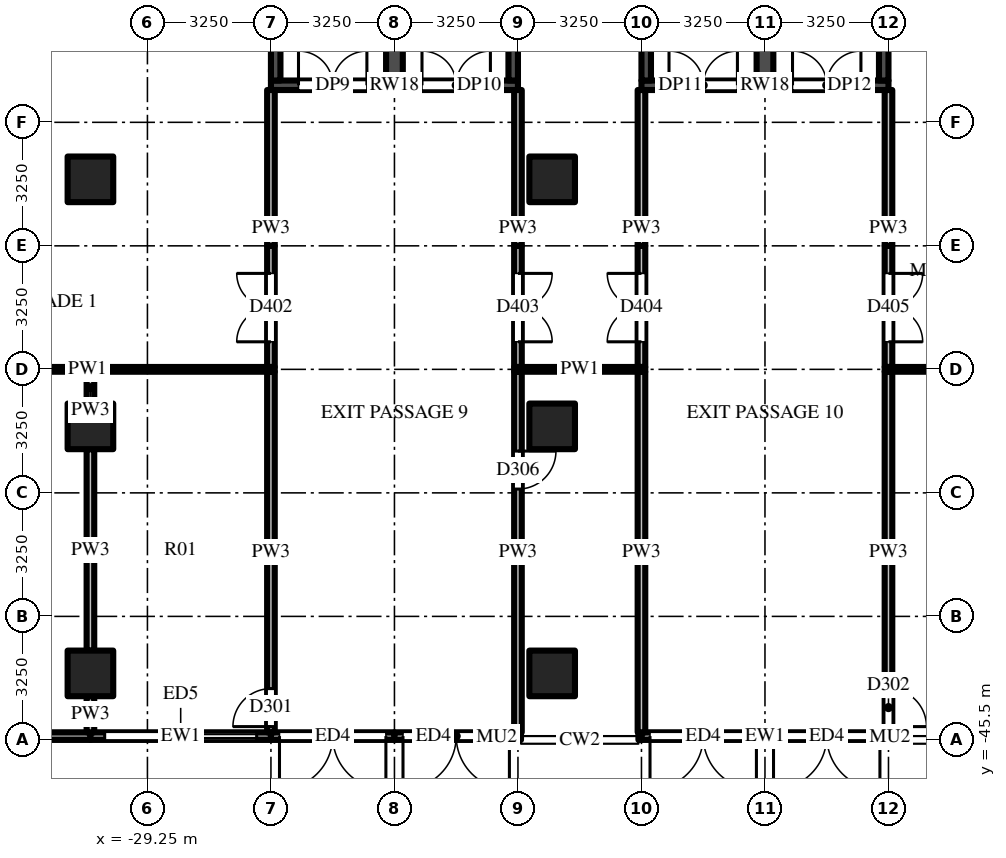
"""IFC4 building model, lengths in metres.
Left out: names, types, materials, properties, quantities, classifications, styles, units other than length and angle.
Written with IfcOpenShell. Run it as: python <this file> out.ifc"""

import sys

from ifc_helpers import new_model, si_unit, direction, frame, frame_2d, origin, origin_2d, place, context, subcontext, project, spatial, rectangle, extrude, source, transform, mapped, element, fill, save


model = new_model("IFC4")
c1 = context("Model", 3, precision=1e-05, world=origin(), true_north=direction((0.0, 1.0)))
c2 = subcontext(c1, "Body", "Model", "MODEL_VIEW")
j1 = project(units=[si_unit("LENGTHUNIT", "METRE"), si_unit("PLANEANGLEUNIT", "RADIAN")], contexts=[c1])
p1 = place(None, origin())
s1 = spatial("IfcSite", under=j1, at=p1, CompositionType="ELEMENT")
p2 = place(p1, origin())
s2 = spatial("IfcBuilding", under=s1, at=p2, CompositionType="ELEMENT")
p3 = place(p2, origin())
s3 = spatial("IfcBuildingStorey", under=s2, at=p3, CompositionType="ELEMENT", Elevation=0.0)
m1 = source(origin(), c2, "Body", "SweptSolid", [
    extrude(rectangle(XDim=1.2, YDim=1.2, at=origin_2d()), origin(), (0.0, 0.0, 1.0), 8.5),
])
for number, where, z_axis, x_axis in (
    (1, (-18.6, -30.75, -0.5), (0.0, 0.0, 1.0), (1.0, 0.0, 0.0)),
    (2, (-18.6, -37.25, -0.5), (0.0, 0.0, 1.0), (1.0, 0.0, 0.0)),
    (3, (-18.6, -43.75, -0.5), (0.0, 0.0, 1.0), (1.0, 0.0, 0.0)),
    (4, (-30.75, -30.75, -0.5), (0.0, 0.0, 1.0), (1.0, 0.0, 0.0)),
    (5, (-30.75, -37.25, -0.5), (0.0, 0.0, 1.0), (1.0, 0.0, 0.0)),
    (6, (-30.75, -43.75, -0.5), (0.0, 0.0, 1.0), (1.0, 0.0, 0.0)),
):
    element("IfcColumn", number, at=place(p3, frame(where, z_axis=z_axis, x_axis=x_axis)), inside=s3, PredefinedType="COLUMN", context=c2, shape_type="MappedRepresentation", body=[
        mapped(m1, transform((0.0, 0.0, 0.0))),
    ])
m2 = source(origin(), c2, "Body", "SweptSolid", [
    extrude(rectangle(XDim=6.5, YDim=0.25, at=frame_2d((3.25, 0.0))), origin(), (0.0, 0.0, 1.0), 7.7),
])
p4 = place(p3, frame((-26.0, -28.275, 0.0), z_axis=(0.0, 0.0, 1.0), x_axis=(1.0, 0.0, 0.0)))
e7 = element("IfcWall", 7, at=p4, inside=s3, PredefinedType="SHEAR", context=c2, shape_type="MappedRepresentation", body=[
    mapped(m2, transform((0.0, 0.0, 0.0))),
])
m3 = source(origin(), c2, "Body", "SweptSolid", [
    extrude(rectangle(XDim=1.8, YDim=2.1, at=frame_2d((0.9, 1.05))), frame((0.0, 0.135, 0.0), z_axis=(0.0, -1.0, 0.0), x_axis=(1.0, 0.0, 0.0)), (0.0, 0.0, 1.0), 0.27),
])
p5 = place(p4, frame((0.725, 0.0, 0.0)))
e8 = element("IfcOpeningElement", 8, at=p5, cuts=e7, PredefinedType="OPENING", context=c2, shape_type="MappedRepresentation", body=[
    mapped(m3, transform((0.0, 0.0, 0.0))),
])
p6 = place(p4, frame((3.975, 0.0, 0.0)))
e9 = element("IfcOpeningElement", 9, at=p6, cuts=e7, PredefinedType="OPENING", context=c2, shape_type="MappedRepresentation", body=[
    mapped(m3, transform((0.0, 0.0, 0.0))),
])
m4 = source(origin(), c2, "Body", "SweptSolid", [
    extrude(rectangle(XDim=8.3, YDim=0.25, at=frame_2d((4.15, 0.0))), origin(), (0.0, 0.0, 1.0), 7.7),
])
for number, where, z_axis, x_axis in (
    (10, (-25.875, -28.15, 0.0), (0.0, 0.0, 1.0), (0.0, 1.0, 0.0)),
    (11, (-19.625, -28.15, 0.0), (0.0, 0.0, 1.0), (0.0, 1.0, 0.0)),
):
    element("IfcWall", number, at=place(p3, frame(where, z_axis=z_axis, x_axis=x_axis)), inside=s3, PredefinedType="SHEAR", context=c2, shape_type="MappedRepresentation", body=[
        mapped(m4, transform((0.0, 0.0, 0.0))),
    ])
m5 = source(origin(), c2, "Body", "SweptSolid", [
    extrude(rectangle(XDim=8.3, YDim=0.44, at=frame_2d((4.15, 0.0))), origin(), (0.0, 0.0, 1.0), 7.7),
])
p7 = place(p3, frame((-22.75, -28.15, 0.0), z_axis=(0.0, 0.0, 1.0), x_axis=(0.0, 1.0, 0.0)))
e12 = element("IfcWall", 12, at=p7, inside=s3, PredefinedType="SHEAR", context=c2, shape_type="MappedRepresentation", body=[
    mapped(m5, transform((0.0, 0.0, 0.0))),
])
p8 = place(p3, frame((-16.25, -28.275, 0.0), z_axis=(0.0, 0.0, 1.0), x_axis=(1.0, 0.0, 0.0)))
e13 = element("IfcWall", 13, at=p8, inside=s3, PredefinedType="SHEAR", context=c2, shape_type="MappedRepresentation", body=[
    mapped(m2, transform((0.0, 0.0, 0.0))),
])
p9 = place(p8, frame((0.725, 0.0, 0.0)))
e14 = element("IfcOpeningElement", 14, at=p9, cuts=e13, PredefinedType="OPENING", context=c2, shape_type="MappedRepresentation", body=[
    mapped(m3, transform((0.0, 0.0, 0.0))),
])
p10 = place(p8, frame((3.975, 0.0, 0.0)))
e15 = element("IfcOpeningElement", 15, at=p10, cuts=e13, PredefinedType="OPENING", context=c2, shape_type="MappedRepresentation", body=[
    mapped(m3, transform((0.0, 0.0, 0.0))),
])
for number, where, z_axis, x_axis in (
    (16, (-16.125, -28.15, 0.0), (0.0, 0.0, 1.0), (0.0, 1.0, 0.0)),
    (17, (-9.875, -28.15, 0.0), (0.0, 0.0, 1.0), (0.0, 1.0, 0.0)),
):
    element("IfcWall", number, at=place(p3, frame(where, z_axis=z_axis, x_axis=x_axis)), inside=s3, PredefinedType="SHEAR", context=c2, shape_type="MappedRepresentation", body=[
        mapped(m4, transform((0.0, 0.0, 0.0))),
    ])
p11 = place(p3, frame((-13.0, -28.15, 0.0), z_axis=(0.0, 0.0, 1.0), x_axis=(0.0, 1.0, 0.0)))
e18 = element("IfcWall", 18, at=p11, inside=s3, PredefinedType="SHEAR", context=c2, shape_type="MappedRepresentation", body=[
    mapped(m5, transform((0.0, 0.0, 0.0))),
])
m6 = source(origin(), c2, "Body", "SweptSolid", [
    extrude(rectangle(XDim=6.5, YDim=0.2, at=frame_2d((3.25, 0.0))), origin(), (0.0, 0.0, 1.0), 7.7),
])
p12 = place(p3, frame((-30.75, -45.4, 0.0), z_axis=(0.0, 0.0, 1.0), x_axis=(-1.0, 0.0, 0.0)))
e19 = element("IfcWall", 19, at=p12, inside=s3, PredefinedType="SOLIDWALL", context=c2, shape_type="MappedRepresentation", body=[
    mapped(m6, transform((0.0, 0.0, 0.0))),
])
m7 = source(origin(), c2, "Body", "SweptSolid", [
    extrude(rectangle(XDim=4.0, YDim=4.5, at=frame_2d((2.0, 2.25))), frame((0.0, 0.11, 0.0), z_axis=(0.0, -1.0, 0.0), x_axis=(1.0, 0.0, 0.0)), (0.0, 0.0, 1.0), 0.22),
])
p13 = place(p12, frame((1.25, 0.0, 0.0)))
e20 = element("IfcOpeningElement", 20, at=p13, cuts=e19, PredefinedType="OPENING", context=c2, shape_type="MappedRepresentation", body=[
    mapped(m7, transform((0.0, 0.0, 0.0))),
])
p14 = place(p3, frame((-26.0, -45.4, 0.0), z_axis=(0.0, 0.0, 1.0), x_axis=(-1.0, 0.0, 0.0)))
e21 = element("IfcWall", 21, at=p14, inside=s3, PredefinedType="SOLIDWALL", context=c2, shape_type="SweptSolid", body=[
    extrude(rectangle(XDim=4.75, YDim=0.2, at=frame_2d((2.375, 0.0))), origin(), (0.0, 0.0, 1.0), 7.7),
])
p15 = place(p14, frame((0.375, 0.0, 0.0)))
e22 = element("IfcOpeningElement", 22, at=p15, cuts=e21, PredefinedType="OPENING", context=c2, shape_type="MappedRepresentation", body=[
    mapped(m7, transform((0.0, 0.0, 0.0))),
])
m8 = source(origin(), c2, "Body", "SweptSolid", [
    extrude(rectangle(XDim=3.25, YDim=0.2, at=frame_2d((1.625, 0.0))), origin(), (0.0, 0.0, 1.0), 7.7),
])
p16 = place(p3, frame((-22.75, -45.4, 0.0), z_axis=(0.0, 0.0, 1.0), x_axis=(-1.0, 0.0, 0.0)))
e23 = element("IfcWall", 23, at=p16, inside=s3, PredefinedType="SOLIDWALL", context=c2, shape_type="MappedRepresentation", body=[
    mapped(m8, transform((0.0, 0.0, 0.0))),
])
m9 = source(origin(), c2, "Body", "SweptSolid", [
    extrude(rectangle(XDim=2.8, YDim=2.4, at=frame_2d((1.4, 1.2))), frame((0.0, 0.11, 0.0), z_axis=(0.0, -1.0, 0.0), x_axis=(1.0, 0.0, 0.0)), (0.0, 0.0, 1.0), 0.22),
])
p17 = place(p16, frame((0.225, 0.0, 0.0)))
e24 = element("IfcOpeningElement", 24, at=p17, cuts=e23, PredefinedType="OPENING", context=c2, shape_type="MappedRepresentation", body=[
    mapped(m9, transform((0.0, 0.0, 0.0))),
])
p18 = place(p3, frame((-19.5, -45.4, 0.0), z_axis=(0.0, 0.0, 1.0), x_axis=(-1.0, 0.0, 0.0)))
e25 = element("IfcWall", 25, at=p18, inside=s3, PredefinedType="SOLIDWALL", context=c2, shape_type="MappedRepresentation", body=[
    mapped(m8, transform((0.0, 0.0, 0.0))),
])
p19 = place(p18, frame((0.225, 0.0, 0.0)))
e26 = element("IfcOpeningElement", 26, at=p19, cuts=e25, PredefinedType="OPENING", context=c2, shape_type="MappedRepresentation", body=[
    mapped(m9, transform((0.0, 0.0, 0.0))),
])
p20 = place(p3, frame((-13.0, -45.4, 0.0), z_axis=(0.0, 0.0, 1.0), x_axis=(-1.0, 0.0, 0.0)))
e27 = element("IfcWall", 27, at=p20, inside=s3, PredefinedType="SOLIDWALL", context=c2, shape_type="MappedRepresentation", body=[
    mapped(m8, transform((0.0, 0.0, 0.0))),
])
p21 = place(p20, frame((0.225, 0.0, 0.0)))
e28 = element("IfcOpeningElement", 28, at=p21, cuts=e27, PredefinedType="OPENING", context=c2, shape_type="MappedRepresentation", body=[
    mapped(m9, transform((0.0, 0.0, 0.0))),
])
p22 = place(p3, frame((-9.75, -45.4, 0.0), z_axis=(0.0, 0.0, 1.0), x_axis=(-1.0, 0.0, 0.0)))
e29 = element("IfcWall", 29, at=p22, inside=s3, PredefinedType="SOLIDWALL", context=c2, shape_type="MappedRepresentation", body=[
    mapped(m8, transform((0.0, 0.0, 0.0))),
])
p23 = place(p22, frame((0.225, 0.0, 0.0)))
e30 = element("IfcOpeningElement", 30, at=p23, cuts=e29, PredefinedType="OPENING", context=c2, shape_type="MappedRepresentation", body=[
    mapped(m9, transform((0.0, 0.0, 0.0))),
])
p24 = place(p3, frame((-30.75, -45.3, 0.0), z_axis=(0.0, 0.0, 1.0), x_axis=(0.0, 1.0, 0.0)))
e31 = element("IfcWall", 31, at=p24, inside=s3, PredefinedType="PARTITIONING", context=c2, shape_type="SweptSolid", body=[
    extrude(rectangle(XDim=0.95, YDim=0.2, at=frame_2d((0.475, 0.0))), origin(), (0.0, 0.0, 1.0), 7.7),
])
p25 = place(p3, frame((-30.75, -43.15, 0.0), z_axis=(0.0, 0.0, 1.0), x_axis=(0.0, 1.0, 0.0)))
e32 = element("IfcWall", 32, at=p25, inside=s3, PredefinedType="PARTITIONING", context=c2, shape_type="SweptSolid", body=[
    extrude(rectangle(XDim=5.3, YDim=0.2, at=frame_2d((2.65, 0.0))), origin(), (0.0, 0.0, 1.0), 6.997),
])
p26 = place(p3, frame((-30.75, -36.65, 0.0), z_axis=(0.0, 0.0, 1.0), x_axis=(0.0, 1.0, 0.0)))
e33 = element("IfcWall", 33, at=p26, inside=s3, PredefinedType="PARTITIONING", context=c2, shape_type="SweptSolid", body=[
    extrude(rectangle(XDim=0.837, YDim=0.2, at=frame_2d((0.419, 0.0))), origin(), (0.0, 0.0, 1.0), 6.997),
])
m10 = source(origin(), c2, "Body", "SweptSolid", [
    extrude(rectangle(XDim=3.188, YDim=0.2, at=frame_2d((1.594, 0.0))), origin(), (0.0, 0.0, 1.0), 6.997),
])
p27 = place(p3, frame((-26.0, -35.688, 0.0), z_axis=(0.0, 0.0, 1.0), x_axis=(0.0, 1.0, 0.0)))
e34 = element("IfcWall", 34, at=p27, inside=s3, PredefinedType="PARTITIONING", context=c2, shape_type="MappedRepresentation", body=[
    mapped(m10, transform((0.0, 0.0, 0.0))),
])
m11 = source(origin(), c2, "Body", "SweptSolid", [
    extrude(rectangle(XDim=1.8, YDim=2.1, at=frame_2d((0.9, 1.05))), frame((0.0, 0.11, 0.0), z_axis=(0.0, -1.0, 0.0), x_axis=(1.0, 0.0, 0.0)), (0.0, 0.0, 1.0), 0.22),
])
p28 = place(p27, frame((0.663, 0.0, 0.0)))
e35 = element("IfcOpeningElement", 35, at=p28, cuts=e34, PredefinedType="OPENING", context=c2, shape_type="MappedRepresentation", body=[
    mapped(m11, transform((0.0, 0.0, 0.0))),
])
m12 = source(origin(), c2, "Body", "SweptSolid", [
    extrude(rectangle(XDim=4.1, YDim=0.2, at=frame_2d((2.05, 0.0))), origin(), (0.0, 0.0, 1.0), 6.839),
])
p29 = place(p3, frame((-26.0, -28.4, 0.0), z_axis=(0.0, 0.0, 1.0), x_axis=(0.0, -1.0, 0.0)))
e36 = element("IfcWall", 36, at=p29, inside=s3, PredefinedType="PARTITIONING", context=c2, shape_type="MappedRepresentation", body=[
    mapped(m12, transform((0.0, 0.0, 0.0))),
])
m13 = source(origin(), c2, "Body", "SweptSolid", [
    extrude(rectangle(XDim=9.488, YDim=0.2, at=frame_2d((4.744, 0.0))), origin(), (0.0, 0.0, 1.0), 6.839),
])
p30 = place(p3, frame((-26.0, -45.3, 0.0), z_axis=(0.0, 0.0, 1.0), x_axis=(0.0, 1.0, 0.0)))
e37 = element("IfcWall", 37, at=p30, inside=s3, PredefinedType="PARTITIONING", context=c2, shape_type="MappedRepresentation", body=[
    mapped(m13, transform((0.0, 0.0, 0.0))),
])
m14 = source(origin(), c2, "Body", "SweptSolid", [
    extrude(rectangle(XDim=1.0, YDim=2.1, at=frame_2d((0.5, 1.05))), frame((0.0, 0.11, 0.0), z_axis=(0.0, -1.0, 0.0), x_axis=(1.0, 0.0, 0.0)), (0.0, 0.0, 1.0), 0.22),
])
p31 = place(p30, frame((0.15, 0.0, 0.0)))
e38 = element("IfcOpeningElement", 38, at=p31, cuts=e37, PredefinedType="OPENING", context=c2, shape_type="MappedRepresentation", body=[
    mapped(m14, transform((0.0, 0.0, 0.0))),
])
p32 = place(p3, frame((-19.5, -32.5, 0.0), z_axis=(0.0, 0.0, 1.0), x_axis=(0.0, -1.0, 0.0)))
e39 = element("IfcWall", 39, at=p32, inside=s3, PredefinedType="PARTITIONING", context=c2, shape_type="MappedRepresentation", body=[
    mapped(m10, transform((0.0, 0.0, 0.0))),
])
p33 = place(p32, frame((0.725, 0.0, 0.0)))
e40 = element("IfcOpeningElement", 40, at=p33, cuts=e39, PredefinedType="OPENING", context=c2, shape_type="MappedRepresentation", body=[
    mapped(m11, transform((0.0, 0.0, 0.0))),
])
p34 = place(p3, frame((-19.5, -35.812, 0.0), z_axis=(0.0, 0.0, 1.0), x_axis=(0.0, -1.0, 0.0)))
e41 = element("IfcWall", 41, at=p34, inside=s3, PredefinedType="PARTITIONING", context=c2, shape_type="MappedRepresentation", body=[
    mapped(m13, transform((0.0, 0.0, 0.0))),
])
p35 = place(p34, frame((2.087, 0.0, 0.0)))
e42 = element("IfcOpeningElement", 42, at=p35, cuts=e41, PredefinedType="OPENING", context=c2, shape_type="MappedRepresentation", body=[
    mapped(m14, transform((0.0, 0.0, 0.0))),
])
p36 = place(p3, frame((-19.5, -28.4, 0.0), z_axis=(0.0, 0.0, 1.0), x_axis=(0.0, -1.0, 0.0)))
e43 = element("IfcWall", 43, at=p36, inside=s3, PredefinedType="PARTITIONING", context=c2, shape_type="MappedRepresentation", body=[
    mapped(m12, transform((0.0, 0.0, 0.0))),
])
p37 = place(p3, frame((-16.25, -35.688, 0.0), z_axis=(0.0, 0.0, 1.0), x_axis=(0.0, 1.0, 0.0)))
e44 = element("IfcWall", 44, at=p37, inside=s3, PredefinedType="PARTITIONING", context=c2, shape_type="MappedRepresentation", body=[
    mapped(m10, transform((0.0, 0.0, 0.0))),
])
p38 = place(p37, frame((0.663, 0.0, 0.0)))
e45 = element("IfcOpeningElement", 45, at=p38, cuts=e44, PredefinedType="OPENING", context=c2, shape_type="MappedRepresentation", body=[
    mapped(m11, transform((0.0, 0.0, 0.0))),
])
m15 = source(origin(), c2, "Body", "SweptSolid", [
    extrude(rectangle(XDim=9.488, YDim=0.2, at=frame_2d((4.744, 0.0))), origin(), (0.0, 0.0, 1.0), 6.762),
])
p39 = place(p3, frame((-16.25, -45.3, 0.0), z_axis=(0.0, 0.0, 1.0), x_axis=(0.0, 1.0, 0.0)))
e46 = element("IfcWall", 46, at=p39, inside=s3, PredefinedType="PARTITIONING", context=c2, shape_type="MappedRepresentation", body=[
    mapped(m15, transform((0.0, 0.0, 0.0))),
])
m16 = source(origin(), c2, "Body", "SweptSolid", [
    extrude(rectangle(XDim=4.1, YDim=0.2, at=frame_2d((2.05, 0.0))), origin(), (0.0, 0.0, 1.0), 6.762),
])
p40 = place(p3, frame((-16.25, -32.5, 0.0), z_axis=(0.0, 0.0, 1.0), x_axis=(0.0, 1.0, 0.0)))
e47 = element("IfcWall", 47, at=p40, inside=s3, PredefinedType="PARTITIONING", context=c2, shape_type="MappedRepresentation", body=[
    mapped(m16, transform((0.0, 0.0, 0.0))),
])
p41 = place(p3, frame((-9.75, -32.5, 0.0), z_axis=(0.0, 0.0, 1.0), x_axis=(0.0, -1.0, 0.0)))
e48 = element("IfcWall", 48, at=p41, inside=s3, PredefinedType="PARTITIONING", context=c2, shape_type="MappedRepresentation", body=[
    mapped(m10, transform((0.0, 0.0, 0.0))),
])
p42 = place(p41, frame((0.725, 0.0, 0.0)))
e49 = element("IfcOpeningElement", 49, at=p42, cuts=e48, PredefinedType="OPENING", context=c2, shape_type="MappedRepresentation", body=[
    mapped(m11, transform((0.0, 0.0, 0.0))),
])
p43 = place(p3, frame((-9.75, -35.812, 0.0), z_axis=(0.0, 0.0, 1.0), x_axis=(0.0, -1.0, 0.0)))
e50 = element("IfcWall", 50, at=p43, inside=s3, PredefinedType="PARTITIONING", context=c2, shape_type="MappedRepresentation", body=[
    mapped(m15, transform((0.0, 0.0, 0.0))),
])
p44 = place(p43, frame((8.337, 0.0, 0.0)))
e51 = element("IfcOpeningElement", 51, at=p44, cuts=e50, PredefinedType="OPENING", context=c2, shape_type="MappedRepresentation", body=[
    mapped(m14, transform((0.0, 0.0, 0.0))),
])
p45 = place(p3, frame((-9.75, -32.5, 0.0), z_axis=(0.0, 0.0, 1.0), x_axis=(0.0, 1.0, 0.0)))
e52 = element("IfcWall", 52, at=p45, inside=s3, PredefinedType="PARTITIONING", context=c2, shape_type="MappedRepresentation", body=[
    mapped(m16, transform((0.0, 0.0, 0.0))),
])
m17 = source(origin(), c2, "Body", "SweptSolid", [
    extrude(rectangle(XDim=9.85, YDim=0.125, at=frame_2d((4.925, 0.0))), origin(), (0.0, 0.0, 1.0), 6.997),
])
p46 = place(p3, frame((-25.9, -35.75, 0.0), z_axis=(0.0, 0.0, 1.0), x_axis=(-1.0, 0.0, 0.0)))
e53 = element("IfcWall", 53, at=p46, inside=s3, PredefinedType="PARTITIONING", context=c2, shape_type="MappedRepresentation", body=[
    mapped(m17, transform((0.0, 0.0, 0.0))),
])
m18 = source(origin(), c2, "Body", "SweptSolid", [
    extrude(rectangle(XDim=1.8, YDim=2.1, at=frame_2d((0.9, 1.05))), frame((0.0, 0.073, 0.0), z_axis=(0.0, -1.0, 0.0), x_axis=(1.0, 0.0, 0.0)), (0.0, 0.0, 1.0), 0.145),
])
p47 = place(p46, frame((7.7, 0.0, 0.0)))
e54 = element("IfcOpeningElement", 54, at=p47, cuts=e53, PredefinedType="OPENING", context=c2, shape_type="MappedRepresentation", body=[
    mapped(m18, transform((0.0, 0.0, 0.0))),
])
m19 = source(origin(), c2, "Body", "SweptSolid", [
    extrude(rectangle(XDim=3.45, YDim=0.125, at=frame_2d((1.725, 0.0))), origin(), (0.0, 0.0, 1.0), 6.997),
])
p48 = place(p3, frame((-16.15, -35.75, 0.0), z_axis=(0.0, 0.0, 1.0), x_axis=(-1.0, 0.0, 0.0)))
e55 = element("IfcWall", 55, at=p48, inside=s3, PredefinedType="PARTITIONING", context=c2, shape_type="MappedRepresentation", body=[
    mapped(m19, transform((0.0, 0.0, 0.0))),
])
p49 = place(p3, frame((-3.15, -35.75, 0.0), z_axis=(0.0, 0.0, 1.0), x_axis=(-1.0, 0.0, 0.0)))
e56 = element("IfcWall", 56, at=p49, inside=s3, PredefinedType="PARTITIONING", context=c2, shape_type="SweptSolid", body=[
    extrude(rectangle(XDim=6.7, YDim=0.125, at=frame_2d((3.35, 0.0))), origin(), (0.0, 0.0, 1.0), 6.997),
])
m20 = source(origin(), c2, "Body", "SweptSolid", [
    extrude(rectangle(XDim=1.8, YDim=2.1, at=frame_2d((0.9, 1.05))), frame((0.0, 0.025, 0.0), z_axis=(0.0, -1.0, 0.0), x_axis=(1.0, 0.0, 0.0)), (0.0, 0.0, 1.0), 0.05),
])
p50 = place(p5, origin())
e57 = element("IfcDoor", 57, at=p50, inside=s3, OperationType="DOUBLE_DOOR_SINGLE_SWING", PredefinedType="DOOR", context=c2, shape_type="MappedRepresentation", body=[
    mapped(m20, transform((0.0, 0.0, 0.0))),
])
fill(e8, e57)
p51 = place(p6, origin())
e58 = element("IfcDoor", 58, at=p51, inside=s3, OperationType="DOUBLE_DOOR_SINGLE_SWING", PredefinedType="DOOR", context=c2, shape_type="MappedRepresentation", body=[
    mapped(m20, transform((0.0, 0.0, 0.0))),
])
fill(e9, e58)
p52 = place(p9, origin())
e59 = element("IfcDoor", 59, at=p52, inside=s3, OperationType="DOUBLE_DOOR_SINGLE_SWING", PredefinedType="DOOR", context=c2, shape_type="MappedRepresentation", body=[
    mapped(m20, transform((0.0, 0.0, 0.0))),
])
fill(e14, e59)
p53 = place(p10, origin())
e60 = element("IfcDoor", 60, at=p53, inside=s3, OperationType="DOUBLE_DOOR_SINGLE_SWING", PredefinedType="DOOR", context=c2, shape_type="MappedRepresentation", body=[
    mapped(m20, transform((0.0, 0.0, 0.0))),
])
fill(e15, e60)
m21 = source(origin(), c2, "Body", "SweptSolid", [
    extrude(rectangle(XDim=4.0, YDim=4.5, at=frame_2d((2.0, 2.25))), frame((0.0, 0.025, 0.0), z_axis=(0.0, -1.0, 0.0), x_axis=(1.0, 0.0, 0.0)), (0.0, 0.0, 1.0), 0.05),
])
p54 = place(p15, origin())
e61 = element("IfcDoor", 61, at=p54, inside=s3, OperationType="ROLLINGUP", PredefinedType="DOOR", context=c2, shape_type="MappedRepresentation", body=[
    mapped(m21, transform((0.0, 0.0, 0.0))),
])
fill(e22, e61)
m22 = source(origin(), c2, "Body", "SweptSolid", [
    extrude(rectangle(XDim=2.8, YDim=2.4, at=frame_2d((1.4, 1.2))), frame((0.0, 0.025, 0.0), z_axis=(0.0, -1.0, 0.0), x_axis=(1.0, 0.0, 0.0)), (0.0, 0.0, 1.0), 0.05),
])
p55 = place(p17, origin())
e62 = element("IfcDoor", 62, at=p55, inside=s3, OperationType="DOUBLE_DOOR_SINGLE_SWING", PredefinedType="DOOR", context=c2, shape_type="MappedRepresentation", body=[
    mapped(m22, transform((0.0, 0.0, 0.0))),
])
fill(e24, e62)
p56 = place(p19, origin())
e63 = element("IfcDoor", 63, at=p56, inside=s3, OperationType="DOUBLE_DOOR_SINGLE_SWING", PredefinedType="DOOR", context=c2, shape_type="MappedRepresentation", body=[
    mapped(m22, transform((0.0, 0.0, 0.0))),
])
fill(e26, e63)
p57 = place(p21, origin())
e64 = element("IfcDoor", 64, at=p57, inside=s3, OperationType="DOUBLE_DOOR_SINGLE_SWING", PredefinedType="DOOR", context=c2, shape_type="MappedRepresentation", body=[
    mapped(m22, transform((0.0, 0.0, 0.0))),
])
fill(e28, e64)
p58 = place(p23, origin())
e65 = element("IfcDoor", 65, at=p58, inside=s3, OperationType="DOUBLE_DOOR_SINGLE_SWING", PredefinedType="DOOR", context=c2, shape_type="MappedRepresentation", body=[
    mapped(m22, transform((0.0, 0.0, 0.0))),
])
fill(e30, e65)
m23 = source(origin(), c2, "Body", "SweptSolid", [
    extrude(rectangle(XDim=1.0, YDim=2.1, at=frame_2d((0.5, 1.05))), frame((0.0, 0.025, 0.0), z_axis=(0.0, -1.0, 0.0), x_axis=(1.0, 0.0, 0.0)), (0.0, 0.0, 1.0), 0.05),
])
p59 = place(p31, origin())
e66 = element("IfcDoor", 66, at=p59, inside=s3, OperationType="SINGLE_SWING_LEFT", PredefinedType="DOOR", context=c2, shape_type="MappedRepresentation", body=[
    mapped(m23, transform((0.0, 0.0, 0.0))),
])
fill(e38, e66)
p60 = place(p44, origin())
e67 = element("IfcDoor", 67, at=p60, inside=s3, OperationType="SINGLE_SWING_RIGHT", PredefinedType="DOOR", context=c2, shape_type="MappedRepresentation", body=[
    mapped(m23, transform((0.0, 0.0, 0.0))),
])
fill(e51, e67)
p61 = place(p35, origin())
e68 = element("IfcDoor", 68, at=p61, inside=s3, OperationType="SINGLE_SWING_LEFT", PredefinedType="DOOR", context=c2, shape_type="MappedRepresentation", body=[
    mapped(m23, transform((0.0, 0.0, 0.0))),
])
fill(e42, e68)
p62 = place(p28, origin())
e69 = element("IfcDoor", 69, at=p62, inside=s3, OperationType="DOUBLE_DOOR_SINGLE_SWING", PredefinedType="DOOR", context=c2, shape_type="MappedRepresentation", body=[
    mapped(m20, transform((0.0, 0.0, 0.0))),
])
fill(e35, e69)
p63 = place(p33, origin())
e70 = element("IfcDoor", 70, at=p63, inside=s3, OperationType="DOUBLE_DOOR_SINGLE_SWING", PredefinedType="DOOR", context=c2, shape_type="MappedRepresentation", body=[
    mapped(m20, transform((0.0, 0.0, 0.0))),
])
fill(e40, e70)
p64 = place(p38, origin())
e71 = element("IfcDoor", 71, at=p64, inside=s3, OperationType="DOUBLE_DOOR_SINGLE_SWING", PredefinedType="DOOR", context=c2, shape_type="MappedRepresentation", body=[
    mapped(m20, transform((0.0, 0.0, 0.0))),
])
fill(e45, e71)
p65 = place(p42, origin())
e72 = element("IfcDoor", 72, at=p65, inside=s3, OperationType="DOUBLE_DOOR_SINGLE_SWING", PredefinedType="DOOR", context=c2, shape_type="MappedRepresentation", body=[
    mapped(m20, transform((0.0, 0.0, 0.0))),
])
fill(e49, e72)
save(model, sys.argv[1])
